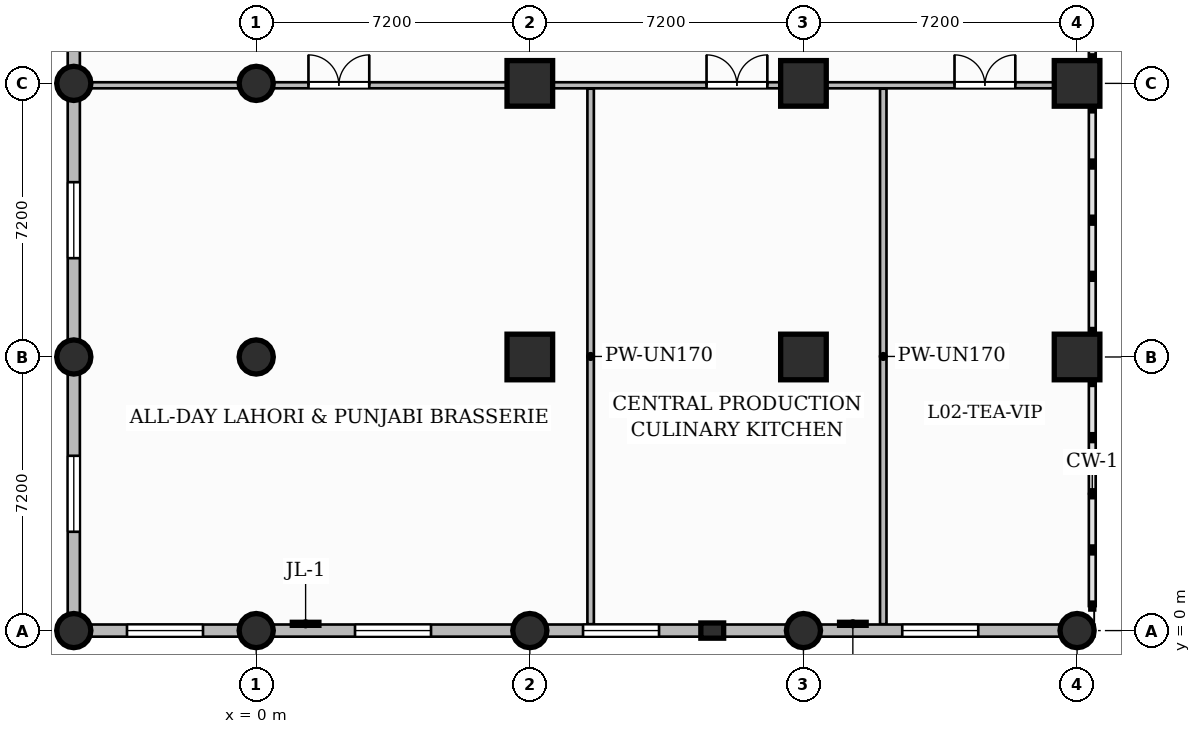
"""IFC4 building model, lengths in metres.
Left out: names, types, materials, properties, quantities, classifications, styles, units other than length and angle.
Written with IfcOpenShell. Run it as: python <this file> out.ifc"""

import sys

from ifc_helpers import new_model, si_unit, direction, frame, frame_2d, origin, origin_2d, place, context, subcontext, project, spatial, rectangle, circle, extrude, source, transform, mapped, element, fill, save


model = new_model("IFC4")
c1 = context("Model", 3, precision=1e-05, world=origin(), true_north=direction((0.0, 1.0)))
c2 = subcontext(c1, "Body", "Model", "MODEL_VIEW")
j1 = project(units=[si_unit("LENGTHUNIT", "METRE"), si_unit("PLANEANGLEUNIT", "RADIAN")], contexts=[c1])
p1 = place(None, origin())
s1 = spatial("IfcSite", under=j1, at=p1, CompositionType="ELEMENT")
p2 = place(p1, origin())
s2 = spatial("IfcBuilding", under=s1, at=p2, CompositionType="ELEMENT")
p3 = place(p2, frame((0.0, 0.0, 10.8)))
s3 = spatial("IfcBuildingStorey", under=s2, at=p3, CompositionType="ELEMENT", Elevation=10.8)
m1 = source(origin(), c2, "Body", "SweptSolid", [
    extrude(circle(Radius=0.45, at=origin_2d()), origin(), (0.0, 0.0, 1.0), 5.4),
])
for number, where, z_axis, x_axis in (
    (1, (-4.8, 0.0, 0.0), (0.0, 0.0, 1.0), (1.0, 0.0, 0.0)),
    (2, (-4.8, 7.2, 0.0), (0.0, 0.0, 1.0), (1.0, 0.0, 0.0)),
    (3, (-4.8, 14.4, 0.0), (0.0, 0.0, 1.0), (1.0, 0.0, 0.0)),
    (4, (0.0, 0.0, 0.0), (0.0, 0.0, 1.0), (1.0, 0.0, 0.0)),
    (5, (0.0, 7.2, 0.0), (0.0, 0.0, 1.0), (1.0, 0.0, 0.0)),
    (6, (0.0, 14.4, 0.0), (0.0, 0.0, 1.0), (1.0, 0.0, 0.0)),
    (7, (7.2, 0.0, 0.0), (0.0, 0.0, 1.0), (1.0, 0.0, 0.0)),
):
    element("IfcColumn", number, at=place(p3, frame(where, z_axis=z_axis, x_axis=x_axis)), inside=s3, PredefinedType="COLUMN", context=c2, shape_type="MappedRepresentation", body=[
        mapped(m1, transform((0.0, 0.0, 0.0), scale=1.0)),
    ])
m2 = source(origin(), c2, "Body", "SweptSolid", [
    extrude(rectangle(XDim=1.2, YDim=1.2, at=origin_2d()), origin(), (0.0, 0.0, 1.0), 5.4),
])
for number, where, z_axis, x_axis in (
    (8, (7.2, 7.2, 0.0), (0.0, 0.0, 1.0), (1.0, 0.0, 0.0)),
    (9, (7.2, 14.4, 0.0), (0.0, 0.0, 1.0), (1.0, 0.0, 0.0)),
):
    element("IfcColumn", number, at=place(p3, frame(where, z_axis=z_axis, x_axis=x_axis)), inside=s3, PredefinedType="COLUMN", context=c2, shape_type="MappedRepresentation", body=[
        mapped(m2, transform((0.0, 0.0, 0.0), scale=1.0)),
    ])
p4 = place(p3, frame((14.4, 0.0, 0.0), z_axis=(0.0, 0.0, 1.0), x_axis=(1.0, 0.0, 0.0)))
e10 = element("IfcColumn", 10, at=p4, inside=s3, PredefinedType="COLUMN", context=c2, shape_type="MappedRepresentation", body=[
    mapped(m1, transform((0.0, 0.0, 0.0), scale=1.0)),
])
for number, where, z_axis, x_axis in (
    (11, (14.4, 7.2, 0.0), (0.0, 0.0, 1.0), (1.0, 0.0, 0.0)),
    (12, (14.4, 14.4, 0.0), (0.0, 0.0, 1.0), (1.0, 0.0, 0.0)),
):
    element("IfcColumn", number, at=place(p3, frame(where, z_axis=z_axis, x_axis=x_axis)), inside=s3, PredefinedType="COLUMN", context=c2, shape_type="MappedRepresentation", body=[
        mapped(m2, transform((0.0, 0.0, 0.0), scale=1.0)),
    ])
p5 = place(p3, frame((21.6, 0.0, 0.0), z_axis=(0.0, 0.0, 1.0), x_axis=(1.0, 0.0, 0.0)))
e13 = element("IfcColumn", 13, at=p5, inside=s3, PredefinedType="COLUMN", context=c2, shape_type="MappedRepresentation", body=[
    mapped(m1, transform((0.0, 0.0, 0.0), scale=1.0)),
])
for number, where, z_axis, x_axis in (
    (14, (21.6, 7.2, 0.0), (0.0, 0.0, 1.0), (1.0, 0.0, 0.0)),
    (15, (21.6, 14.4, 0.0), (0.0, 0.0, 1.0), (1.0, 0.0, 0.0)),
):
    element("IfcColumn", number, at=place(p3, frame(where, z_axis=z_axis, x_axis=x_axis)), inside=s3, PredefinedType="COLUMN", context=c2, shape_type="MappedRepresentation", body=[
        mapped(m2, transform((0.0, 0.0, 0.0), scale=1.0)),
    ])
m3 = source(origin(), c2, "Body", "SweptSolid", [
    extrude(rectangle(XDim=0.6, YDim=0.4, at=origin_2d()), origin(), (0.0, 0.0, 1.0), 5.4),
])
p6 = place(p3, frame((12.0, 0.0, 0.0), z_axis=(0.0, 0.0, 1.0), x_axis=(1.0, 0.0, 0.0)))
e16 = element("IfcColumn", 16, at=p6, inside=s3, PredefinedType="PILASTER", context=c2, shape_type="MappedRepresentation", body=[
    mapped(m3, transform((0.0, 0.0, 0.0), scale=1.0)),
])
p7 = place(p3, frame((-4.36, 14.35, 0.0), z_axis=(0.0, 0.0, 1.0), x_axis=(1.0, 0.0, 0.0)))
e17 = element("IfcWall", 17, at=p7, inside=s3, PredefinedType="PARTITIONING", context=c2, shape_type="SweptSolid", body=[
    extrude(rectangle(XDim=26.12, YDim=0.16, at=frame_2d((13.06, 0.0))), origin(), (0.0, 0.0, 1.0), 4.185),
])
p8 = place(p7, frame((5.735, 0.0, 0.0)))
e18 = element("IfcOpeningElement", 18, at=p8, cuts=e17, PredefinedType="OPENING", context=c2, shape_type="SweptSolid", body=[
    extrude(rectangle(XDim=1.6, YDim=2.4, at=frame_2d((0.8, 1.2))), frame((0.0, 0.09, 0.0), z_axis=(0.0, -1.0, 0.0), x_axis=(1.0, 0.0, 0.0)), (0.0, 0.0, 1.0), 0.18),
])
p9 = place(p7, frame((16.21, 0.0, 0.0)))
e19 = element("IfcOpeningElement", 19, at=p9, cuts=e17, PredefinedType="OPENING", context=c2, shape_type="SweptSolid", body=[
    extrude(rectangle(XDim=1.6, YDim=2.4, at=frame_2d((0.8, 1.2))), frame((0.0, 0.09, 0.0), z_axis=(0.0, -1.0, 0.0), x_axis=(1.0, 0.0, 0.0)), (0.0, 0.0, 1.0), 0.18),
])
p10 = place(p7, frame((22.735, 0.0, 0.0)))
e20 = element("IfcOpeningElement", 20, at=p10, cuts=e17, PredefinedType="OPENING", context=c2, shape_type="SweptSolid", body=[
    extrude(rectangle(XDim=1.6, YDim=2.4, at=frame_2d((0.8, 1.2))), frame((0.0, 0.09, 0.0), z_axis=(0.0, -1.0, 0.0), x_axis=(1.0, 0.0, 0.0)), (0.0, 0.0, 1.0), 0.18),
])
for number, where, z_axis, x_axis in (
    (21, (8.8, 0.168, 0.0), (0.0, 0.0, 1.0), (0.0, 1.0, 0.0)),
    (22, (16.5, 0.168, 0.0), (0.0, 0.0, 1.0), (0.0, 1.0, 0.0)),
):
    element("IfcWall", number, at=place(p3, frame(where, z_axis=z_axis, x_axis=x_axis)), inside=s3, PredefinedType="PARTITIONING", context=c2, shape_type="SweptSolid", body=[
        extrude(rectangle(XDim=14.092, YDim=0.17, at=frame_2d((7.046, 0.0))), origin(), (0.0, 0.0, 1.0), 5.1),
    ])
p11 = place(p3, frame((-4.8, 0.0, 0.0), z_axis=(0.0, 0.0, 1.0), x_axis=(1.0, 0.0, 0.0)))
e23 = element("IfcWall", 23, at=p11, inside=s3, PredefinedType="SOLIDWALL", context=c2, shape_type="SweptSolid", body=[
    extrude(rectangle(XDim=26.85, YDim=0.32, at=frame_2d((13.425, 0.0))), origin(), (0.0, 0.0, 1.0), 4.185),
])
p12 = place(p11, frame((1.4, 0.0, 0.75)))
e24 = element("IfcOpeningElement", 24, at=p12, cuts=e23, PredefinedType="OPENING", context=c2, shape_type="SweptSolid", body=[
    extrude(rectangle(XDim=2.0, YDim=2.6, at=frame_2d((1.0, 1.3))), frame((0.0, 0.17, 0.0), z_axis=(0.0, -1.0, 0.0), x_axis=(1.0, 0.0, 0.0)), (0.0, 0.0, 1.0), 0.34),
])
p13 = place(p11, frame((7.4, 0.0, 0.75)))
e25 = element("IfcOpeningElement", 25, at=p13, cuts=e23, PredefinedType="OPENING", context=c2, shape_type="SweptSolid", body=[
    extrude(rectangle(XDim=2.0, YDim=2.6, at=frame_2d((1.0, 1.3))), frame((0.0, 0.17, 0.0), z_axis=(0.0, -1.0, 0.0), x_axis=(1.0, 0.0, 0.0)), (0.0, 0.0, 1.0), 0.34),
])
p14 = place(p11, frame((13.4, 0.0, 0.75)))
e26 = element("IfcOpeningElement", 26, at=p14, cuts=e23, PredefinedType="OPENING", context=c2, shape_type="SweptSolid", body=[
    extrude(rectangle(XDim=2.0, YDim=2.6, at=frame_2d((1.0, 1.3))), frame((0.0, 0.17, 0.0), z_axis=(0.0, -1.0, 0.0), x_axis=(1.0, 0.0, 0.0)), (0.0, 0.0, 1.0), 0.34),
])
p15 = place(p11, frame((21.8, 0.0, 0.75)))
e27 = element("IfcOpeningElement", 27, at=p15, cuts=e23, PredefinedType="OPENING", context=c2, shape_type="SweptSolid", body=[
    extrude(rectangle(XDim=2.0, YDim=2.6, at=frame_2d((1.0, 1.3))), frame((0.0, 0.17, 0.0), z_axis=(0.0, -1.0, 0.0), x_axis=(1.0, 0.0, 0.0)), (0.0, 0.0, 1.0), 0.34),
])
p16 = place(p3, frame((-4.8, 0.05, 0.0), z_axis=(0.0, 0.0, 1.0), x_axis=(0.0, 1.0, 0.0)))
e28 = element("IfcWall", 28, at=p16, inside=s3, PredefinedType="SOLIDWALL", context=c2, shape_type="SweptSolid", body=[
    extrude(rectangle(XDim=46.7, YDim=0.32, at=frame_2d((23.35, 0.0))), origin(), (0.0, 0.0, 1.0), 4.185),
])
p17 = place(p16, frame((2.55, 0.0, 0.75)))
e29 = element("IfcOpeningElement", 29, at=p17, cuts=e28, PredefinedType="OPENING", context=c2, shape_type="SweptSolid", body=[
    extrude(rectangle(XDim=2.0, YDim=2.6, at=frame_2d((1.0, 1.3))), frame((0.0, 0.17, 0.0), z_axis=(0.0, -1.0, 0.0), x_axis=(1.0, 0.0, 0.0)), (0.0, 0.0, 1.0), 0.34),
])
p18 = place(p16, frame((9.75, 0.0, 0.75)))
e30 = element("IfcOpeningElement", 30, at=p18, cuts=e28, PredefinedType="OPENING", context=c2, shape_type="SweptSolid", body=[
    extrude(rectangle(XDim=2.0, YDim=2.6, at=frame_2d((1.0, 1.3))), frame((0.0, 0.17, 0.0), z_axis=(0.0, -1.0, 0.0), x_axis=(1.0, 0.0, 0.0)), (0.0, 0.0, 1.0), 0.34),
])
p19 = place(p16, frame((16.95, 0.0, 0.75)))
e31 = element("IfcOpeningElement", 31, at=p19, cuts=e28, PredefinedType="OPENING", context=c2, shape_type="SweptSolid", body=[
    extrude(rectangle(XDim=2.0, YDim=2.6, at=frame_2d((1.0, 1.3))), frame((0.0, 0.17, 0.0), z_axis=(0.0, -1.0, 0.0), x_axis=(1.0, 0.0, 0.0)), (0.0, 0.0, 1.0), 0.34),
])
p20 = place(p16, frame((27.75, 0.0, 0.75)))
e32 = element("IfcOpeningElement", 32, at=p20, cuts=e28, PredefinedType="OPENING", context=c2, shape_type="SweptSolid", body=[
    extrude(rectangle(XDim=2.0, YDim=2.6, at=frame_2d((1.0, 1.3))), frame((0.0, 0.17, 0.0), z_axis=(0.0, -1.0, 0.0), x_axis=(1.0, 0.0, 0.0)), (0.0, 0.0, 1.0), 0.34),
])
p21 = place(p16, frame((34.95, 0.0, 0.75)))
e33 = element("IfcOpeningElement", 33, at=p21, cuts=e28, PredefinedType="OPENING", context=c2, shape_type="SweptSolid", body=[
    extrude(rectangle(XDim=2.0, YDim=2.6, at=frame_2d((1.0, 1.3))), frame((0.0, 0.17, 0.0), z_axis=(0.0, -1.0, 0.0), x_axis=(1.0, 0.0, 0.0)), (0.0, 0.0, 1.0), 0.34),
])
p22 = place(p16, frame((42.15, 0.0, 0.75)))
e34 = element("IfcOpeningElement", 34, at=p22, cuts=e28, PredefinedType="OPENING", context=c2, shape_type="SweptSolid", body=[
    extrude(rectangle(XDim=2.0, YDim=2.6, at=frame_2d((1.0, 1.3))), frame((0.0, 0.17, 0.0), z_axis=(0.0, -1.0, 0.0), x_axis=(1.0, 0.0, 0.0)), (0.0, 0.0, 1.0), 0.34),
])
m4 = source(origin(), c2, "Body", "SweptSolid", [
    extrude(rectangle(XDim=1.6, YDim=2.4, at=frame_2d((0.8, 1.2))), frame((0.0, 0.025, 0.0), z_axis=(0.0, -1.0, 0.0), x_axis=(1.0, 0.0, 0.0)), (0.0, 0.0, 1.0), 0.05),
])
p23 = place(p8, origin())
e35 = element("IfcDoor", 35, at=p23, inside=s3, OperationType="DOUBLE_DOOR_SINGLE_SWING", PredefinedType="DOOR", context=c2, shape_type="MappedRepresentation", body=[
    mapped(m4, transform((0.0, 0.0, 0.0), scale=1.0)),
])
fill(e18, e35)
p24 = place(p9, origin())
e36 = element("IfcDoor", 36, at=p24, inside=s3, OperationType="DOUBLE_DOOR_SINGLE_SWING", PredefinedType="DOOR", context=c2, shape_type="MappedRepresentation", body=[
    mapped(m4, transform((0.0, 0.0, 0.0), scale=1.0)),
])
fill(e19, e36)
p25 = place(p10, origin())
e37 = element("IfcDoor", 37, at=p25, inside=s3, OperationType="DOUBLE_DOOR_SINGLE_SWING", PredefinedType="DOOR", context=c2, shape_type="MappedRepresentation", body=[
    mapped(m4, transform((0.0, 0.0, 0.0), scale=1.0)),
])
fill(e20, e37)
m5 = source(origin(), c2, "Body", "SweptSolid", [
    extrude(rectangle(XDim=2.0, YDim=2.6, at=frame_2d((1.0, 1.3))), frame((0.0, 0.03, 0.0), z_axis=(0.0, -1.0, 0.0), x_axis=(1.0, 0.0, 0.0)), (0.0, 0.0, 1.0), 0.06),
])
p26 = place(p12, origin())
e38 = element("IfcWindow", 38, at=p26, inside=s3, PartitioningType="DOUBLE_PANEL_VERTICAL", PredefinedType="WINDOW", context=c2, shape_type="MappedRepresentation", body=[
    mapped(m5, transform((0.0, 0.0, 0.0), scale=1.0)),
])
fill(e24, e38)
p27 = place(p13, origin())
e39 = element("IfcWindow", 39, at=p27, inside=s3, PartitioningType="DOUBLE_PANEL_VERTICAL", PredefinedType="WINDOW", context=c2, shape_type="MappedRepresentation", body=[
    mapped(m5, transform((0.0, 0.0, 0.0), scale=1.0)),
])
fill(e25, e39)
p28 = place(p14, origin())
e40 = element("IfcWindow", 40, at=p28, inside=s3, PartitioningType="DOUBLE_PANEL_VERTICAL", PredefinedType="WINDOW", context=c2, shape_type="MappedRepresentation", body=[
    mapped(m5, transform((0.0, 0.0, 0.0), scale=1.0)),
])
fill(e26, e40)
p29 = place(p15, origin())
e41 = element("IfcWindow", 41, at=p29, inside=s3, PartitioningType="DOUBLE_PANEL_VERTICAL", PredefinedType="WINDOW", context=c2, shape_type="MappedRepresentation", body=[
    mapped(m5, transform((0.0, 0.0, 0.0), scale=1.0)),
])
fill(e27, e41)
p30 = place(p17, origin())
e42 = element("IfcWindow", 42, at=p30, inside=s3, PartitioningType="DOUBLE_PANEL_VERTICAL", PredefinedType="WINDOW", context=c2, shape_type="MappedRepresentation", body=[
    mapped(m5, transform((0.0, 0.0, 0.0), scale=1.0)),
])
fill(e29, e42)
p31 = place(p18, origin())
e43 = element("IfcWindow", 43, at=p31, inside=s3, PartitioningType="DOUBLE_PANEL_VERTICAL", PredefinedType="WINDOW", context=c2, shape_type="MappedRepresentation", body=[
    mapped(m5, transform((0.0, 0.0, 0.0), scale=1.0)),
])
fill(e30, e43)
save(model, sys.argv[1])
